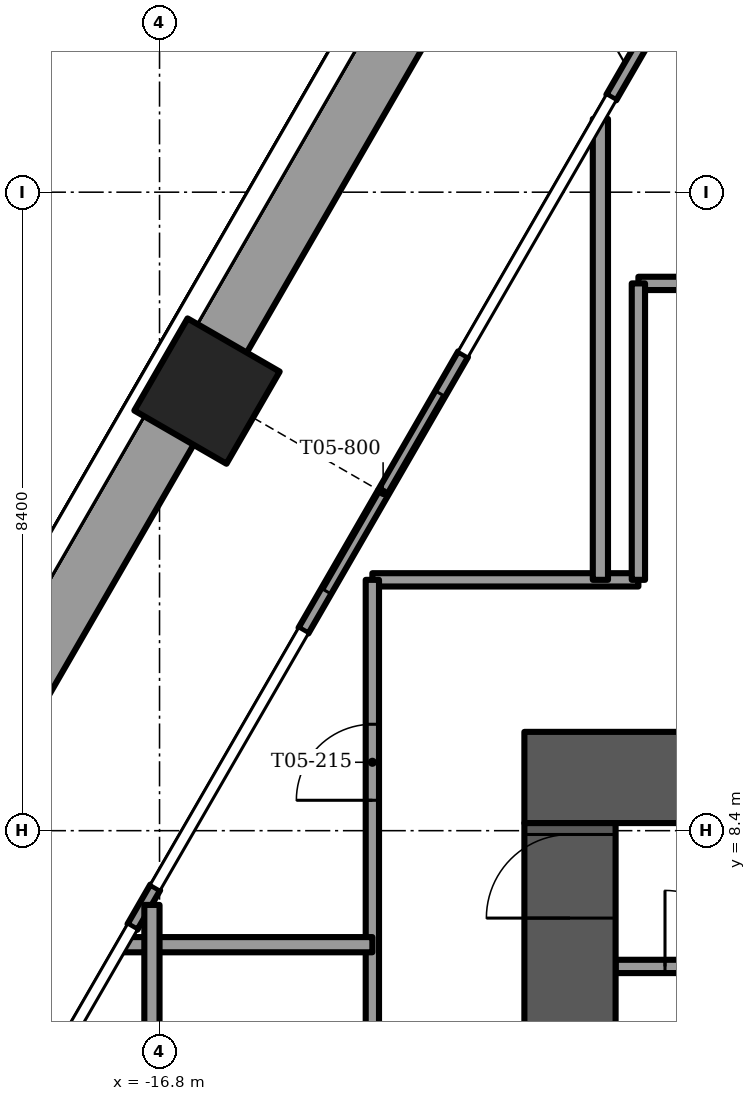
"""IFC4 building model, lengths in metres.
Left out: names, types, materials, properties, quantities, classifications, styles, units other than length and angle.
Written with IfcOpenShell. Run it as: python <this file> out.ifc"""

import sys

from ifc_helpers import new_model, si_unit, direction, frame, frame_2d, origin, origin_2d, place, context, subcontext, project, spatial, rectangle, extrude, element, fill, save


model = new_model("IFC4")
c1 = context("Model", 3, precision=1e-05, world=origin(), true_north=direction((0.0, 1.0)))
c2 = subcontext(c1, "Body", "Model", "MODEL_VIEW")
j1 = project(units=[si_unit("LENGTHUNIT", "METRE"), si_unit("PLANEANGLEUNIT", "RADIAN")], contexts=[c1])
p1 = place(None, origin())
s1 = spatial("IfcSite", under=j1, at=p1, CompositionType="ELEMENT")
p2 = place(p1, origin())
s2 = spatial("IfcBuilding", under=s1, at=p2, CompositionType="ELEMENT")
p3 = place(p2, frame((0.0, 0.0, 23.5)))
s3 = spatial("IfcBuildingStorey", under=s2, at=p3, CompositionType="ELEMENT", Elevation=23.5)
p4 = place(p3, frame((-16.175, 14.183, -1.2), z_axis=(0.0, 0.0, 1.0), x_axis=(0.5, 0.866025403784, 0.0)))
e1 = element("IfcColumn", 1, at=p4, inside=s3, PredefinedType="COLUMN", context=c2, shape_type="SweptSolid", body=[
    extrude(rectangle(XDim=1.4, YDim=1.4, at=origin_2d()), origin(), (0.0, 0.0, 1.0), 4.5),
])
p5 = place(p3, frame((-12.0, 9.1, -0.3), z_axis=(0.0, 0.0, 1.0), x_axis=(1.0, 0.0, 0.0)))
e2 = element("IfcWall", 2, at=p5, inside=s3, PredefinedType="SHEAR", context=c2, shape_type="SweptSolid", body=[
    extrude(rectangle(XDim=24.0, YDim=1.2, at=frame_2d((12.0, 0.0))), origin(), (0.0, 0.0, 1.0), 4.5),
])
p6 = place(p5, frame((11.2, 0.0, 0.0)))
e3 = element("IfcOpeningElement", 3, at=p6, cuts=e2, PredefinedType="OPENING", context=c2, shape_type="SweptSolid", body=[
    extrude(rectangle(XDim=1.6, YDim=2.1, at=frame_2d((0.8, 1.05))), frame((0.0, 0.6, 0.0), z_axis=(0.0, -1.0, 0.0), x_axis=(1.0, 0.0, 0.0)), (0.0, 0.0, 1.0), 1.2),
])
p7 = place(p5, frame((5.25, 0.0, 0.0)))
e4 = element("IfcOpeningElement", 4, at=p7, cuts=e2, PredefinedType="OPENING", context=c2, shape_type="SweptSolid", body=[
    extrude(rectangle(XDim=1.1, YDim=2.1, at=frame_2d((0.55, 1.05))), frame((0.0, 0.6, 0.0), z_axis=(0.0, -1.0, 0.0), x_axis=(1.0, 0.0, 0.0)), (0.0, 0.0, 1.0), 1.2),
])
p8 = place(p5, frame((17.65, 0.0, 0.0)))
e5 = element("IfcOpeningElement", 5, at=p8, cuts=e2, PredefinedType="OPENING", context=c2, shape_type="SweptSolid", body=[
    extrude(rectangle(XDim=1.1, YDim=2.1, at=frame_2d((0.55, 1.05))), frame((0.0, 0.6, 0.0), z_axis=(0.0, -1.0, 0.0), x_axis=(1.0, 0.0, 0.0)), (0.0, 0.0, 1.0), 1.2),
])
p9 = place(p3, frame((-11.4, -0.5, -0.3), z_axis=(0.0, 0.0, 1.0), x_axis=(0.0, 1.0, 0.0)))
e6 = element("IfcWall", 6, at=p9, inside=s3, PredefinedType="SHEAR", context=c2, shape_type="SweptSolid", body=[
    extrude(rectangle(XDim=9.0, YDim=1.2, at=frame_2d((4.5, 0.0))), origin(), (0.0, 0.0, 1.0), 4.5),
])
p10 = place(p9, frame((7.75, 0.0, 0.0)))
e7 = element("IfcOpeningElement", 7, at=p10, cuts=e6, PredefinedType="OPENING", context=c2, shape_type="SweptSolid", body=[
    extrude(rectangle(XDim=1.1, YDim=2.1, at=frame_2d((0.55, 1.05))), frame((0.0, 0.6, 0.0), z_axis=(0.0, -1.0, 0.0), x_axis=(1.0, 0.0, 0.0)), (0.0, 0.0, 1.0), 1.2),
])
p11 = place(p9, frame((0.55, 0.0, 0.0)))
e8 = element("IfcOpeningElement", 8, at=p11, cuts=e6, PredefinedType="OPENING", context=c2, shape_type="SweptSolid", body=[
    extrude(rectangle(XDim=1.2, YDim=2.1, at=frame_2d((0.6, 1.05))), frame((0.0, 0.6, 0.0), z_axis=(0.0, -1.0, 0.0), x_axis=(1.0, 0.0, 0.0)), (0.0, 0.0, 1.0), 1.2),
])
p12 = place(p9, frame((3.0, 0.0, 0.0)))
e9 = element("IfcOpeningElement", 9, at=p12, cuts=e6, PredefinedType="OPENING", context=c2, shape_type="SweptSolid", body=[
    extrude(rectangle(XDim=1.2, YDim=2.1, at=frame_2d((0.6, 1.05))), frame((0.0, 0.6, 0.0), z_axis=(0.0, -1.0, 0.0), x_axis=(1.0, 0.0, 0.0)), (0.0, 0.0, 1.0), 1.2),
])
p13 = place(p3, frame((-12.705, 20.694, 0.0), z_axis=(0.0, 0.0, 1.0), x_axis=(-0.500005133765, -0.866022439784, 0.0)))
e10 = element("IfcWall", 10, at=p13, inside=s3, PredefinedType="PARAPET", context=c2, shape_type="SweptSolid", body=[
    extrude(rectangle(XDim=6.704, YDim=0.9, at=frame_2d((3.352, 0.0))), origin(), (0.0, 0.0, 1.0), 1.1),
])
p14 = place(p3, frame((-16.727, 13.728, 0.0), z_axis=(0.0, 0.0, 1.0), x_axis=(-0.499997206141, -0.866027016814, 0.0)))
e11 = element("IfcWall", 11, at=p14, inside=s3, PredefinedType="PARAPET", context=c2, shape_type="SweptSolid", body=[
    extrude(rectangle(XDim=7.051, YDim=0.9, at=frame_2d((3.525, 0.0))), origin(), (0.0, 0.0, 1.0), 1.1),
])
p15 = place(p3, frame((-12.806, 14.668, 0.0), z_axis=(0.0, 0.0, 1.0), x_axis=(-0.500027713859, -0.866009402589, 0.0)))
e12 = element("IfcWall", 12, at=p15, inside=s3, PredefinedType="SOLIDWALL", context=c2, shape_type="SweptSolid", body=[
    extrude(rectangle(XDim=4.2, YDim=0.15, at=frame_2d((2.1, 0.0))), origin(), (0.0, 0.0, 1.0), 4.2),
])
p16 = place(p15, frame((0.6, 0.0, 0.0)))
e13 = element("IfcOpeningElement", 13, at=p16, cuts=e12, PredefinedType="OPENING", context=c2, shape_type="SweptSolid", body=[
    extrude(rectangle(XDim=3.0, YDim=2.4, at=frame_2d((1.5, 1.2))), frame((0.0, 0.075, 0.0), z_axis=(0.0, -1.0, 0.0), x_axis=(1.0, 0.0, 0.0)), (0.0, 0.0, 1.0), 0.15),
])
p17 = place(p3, frame((-9.56, 20.292, 0.0), z_axis=(0.0, 0.0, 1.0), x_axis=(-0.499945140294, -0.866057074734, 0.0)))
e14 = element("IfcWall", 14, at=p17, inside=s3, PredefinedType="SOLIDWALL", context=c2, shape_type="SweptSolid", body=[
    extrude(rectangle(XDim=2.594, YDim=0.15, at=frame_2d((1.297, 0.0))), origin(), (0.0, 0.0, 1.0), 4.2),
])
p18 = place(p3, frame((-16.856, 7.654, 0.0), z_axis=(0.0, 0.0, 1.0), x_axis=(-0.499945471869, -0.866056883327, 0.0)))
e15 = element("IfcWall", 15, at=p18, inside=s3, PredefinedType="SOLIDWALL", context=c2, shape_type="SweptSolid", body=[
    extrude(rectangle(XDim=0.6, YDim=0.15, at=frame_2d((0.3, 0.0))), origin(), (0.0, 0.0, 1.0), 4.2),
])
p19 = place(p3, frame((-10.8, 6.614, 0.0), z_axis=(0.0, 0.0, 1.0), x_axis=(1.0, 0.0, 0.0)))
e16 = element("IfcWall", 16, at=p19, inside=s3, PredefinedType="PARTITIONING", context=c2, shape_type="SweptSolid", body=[
    extrude(rectangle(XDim=2.3, YDim=0.175, at=frame_2d((1.15, 0.0))), origin(), (0.0, 0.0, 1.0), 4.2),
])
p20 = place(p19, frame((0.65, 0.0, 0.0)))
e17 = element("IfcOpeningElement", 17, at=p20, cuts=e16, PredefinedType="OPENING", context=c2, shape_type="SweptSolid", body=[
    extrude(rectangle(XDim=1.0, YDim=2.1, at=frame_2d((0.5, 1.05))), frame((0.0, 0.087, 0.0), z_axis=(0.0, -1.0, 0.0), x_axis=(1.0, 0.0, 0.0)), (0.0, 0.0, 1.0), 0.175),
])
p21 = place(p3, frame((-14.0, 11.7, 0.0), z_axis=(0.0, 0.0, 1.0), x_axis=(1.0, 0.0, 0.0)))
e18 = element("IfcWall", 18, at=p21, inside=s3, PredefinedType="PARTITIONING", context=c2, shape_type="SweptSolid", body=[
    extrude(rectangle(XDim=3.5, YDim=0.175, at=frame_2d((1.75, 0.0))), origin(), (0.0, 0.0, 1.0), 4.2),
])
p22 = place(p3, frame((-10.5, 15.6, 0.0), z_axis=(0.0, 0.0, 1.0), x_axis=(1.0, 0.0, 0.0)))
e19 = element("IfcWall", 19, at=p22, inside=s3, PredefinedType="PARTITIONING", context=c2, shape_type="SweptSolid", body=[
    extrude(rectangle(XDim=8.772, YDim=0.175, at=frame_2d((4.386, 0.0))), origin(), (0.0, 0.0, 1.0), 4.2),
])
p23 = place(p22, frame((1.8, 0.0, 0.0)))
e20 = element("IfcOpeningElement", 20, at=p23, cuts=e19, PredefinedType="OPENING", context=c2, shape_type="SweptSolid", body=[
    extrude(rectangle(XDim=0.9, YDim=2.1, at=frame_2d((0.45, 1.05))), frame((0.0, 0.087, 0.0), z_axis=(0.0, -1.0, 0.0), x_axis=(1.0, 0.0, 0.0)), (0.0, 0.0, 1.0), 0.175),
])
p24 = place(p3, frame((-14.0, -3.7, 0.0), z_axis=(0.0, 0.0, 1.0), x_axis=(0.0, 1.0, 0.0)))
e21 = element("IfcWall", 21, at=p24, inside=s3, PredefinedType="PARTITIONING", context=c2, shape_type="SweptSolid", body=[
    extrude(rectangle(XDim=15.4, YDim=0.175, at=frame_2d((7.7, 0.0))), origin(), (0.0, 0.0, 1.0), 4.2),
])
p25 = place(p24, frame((0.825, 0.0, 0.0)))
e22 = element("IfcOpeningElement", 22, at=p25, cuts=e21, PredefinedType="OPENING", context=c2, shape_type="SweptSolid", body=[
    extrude(rectangle(XDim=1.0, YDim=2.1, at=frame_2d((0.5, 1.05))), frame((0.0, 0.087, 0.0), z_axis=(0.0, -1.0, 0.0), x_axis=(1.0, 0.0, 0.0)), (0.0, 0.0, 1.0), 0.175),
])
p26 = place(p24, frame((6.125, 0.0, 0.0)))
e23 = element("IfcOpeningElement", 23, at=p26, cuts=e21, PredefinedType="OPENING", context=c2, shape_type="SweptSolid", body=[
    extrude(rectangle(XDim=1.0, YDim=2.1, at=frame_2d((0.5, 1.05))), frame((0.0, 0.087, 0.0), z_axis=(0.0, -1.0, 0.0), x_axis=(1.0, 0.0, 0.0)), (0.0, 0.0, 1.0), 0.175),
])
p27 = place(p24, frame((12.5, 0.0, 0.0)))
e24 = element("IfcOpeningElement", 24, at=p27, cuts=e21, PredefinedType="OPENING", context=c2, shape_type="SweptSolid", body=[
    extrude(rectangle(XDim=1.0, YDim=2.1, at=frame_2d((0.5, 1.05))), frame((0.0, 0.087, 0.0), z_axis=(0.0, -1.0, 0.0), x_axis=(1.0, 0.0, 0.0)), (0.0, 0.0, 1.0), 0.175),
])
p28 = place(p3, frame((-10.5, 11.7, 0.0), z_axis=(0.0, 0.0, 1.0), x_axis=(0.0, 1.0, 0.0)))
e25 = element("IfcWall", 25, at=p28, inside=s3, PredefinedType="PARTITIONING", context=c2, shape_type="SweptSolid", body=[
    extrude(rectangle(XDim=3.9, YDim=0.175, at=frame_2d((1.95, 0.0))), origin(), (0.0, 0.0, 1.0), 4.2),
])
p29 = place(p3, frame((-17.271, 6.9, 0.0), z_axis=(0.0, 0.0, 1.0), x_axis=(1.0, 0.0, 0.0)))
e26 = element("IfcWall", 26, at=p29, inside=s3, PredefinedType="PARTITIONING", context=c2, shape_type="SweptSolid", body=[
    extrude(rectangle(XDim=3.271, YDim=0.2, at=frame_2d((1.635, 0.0))), origin(), (0.0, 0.0, 1.0), 4.2),
])
p30 = place(p3, frame((-16.9, 4.7, 0.0), z_axis=(0.0, 0.0, 1.0), x_axis=(0.0, 1.0, 0.0)))
e27 = element("IfcWall", 27, at=p30, inside=s3, PredefinedType="PARTITIONING", context=c2, shape_type="SweptSolid", body=[
    extrude(rectangle(XDim=2.723, YDim=0.2, at=frame_2d((1.362, 0.0))), origin(), (0.0, 0.0, 1.0), 4.2),
])
p31 = place(p3, frame((-11.0, 11.7, 0.0), z_axis=(0.0, 0.0, 1.0), x_axis=(0.0, 1.0, 0.0)))
e28 = element("IfcWall", 28, at=p31, inside=s3, PredefinedType="PARTITIONING", context=c2, shape_type="SweptSolid", body=[
    extrude(rectangle(XDim=6.064, YDim=0.2, at=frame_2d((3.032, 0.0))), origin(), (0.0, 0.0, 1.0), 4.2),
])
p32 = place(p16, origin())
e29 = element("IfcDoor", 29, at=p32, inside=s3, OperationType="SLIDING_TO_RIGHT", PredefinedType="DOOR", context=c2, shape_type="SweptSolid", body=[
    extrude(rectangle(XDim=3.0, YDim=2.4, at=frame_2d((1.5, 1.2))), frame((0.0, 0.025, 0.0), z_axis=(0.0, -1.0, 0.0), x_axis=(1.0, 0.0, 0.0)), (0.0, 0.0, 1.0), 0.05),
])
fill(e13, e29)
p33 = place(p20, origin())
e30 = element("IfcDoor", 30, at=p33, inside=s3, OperationType="SINGLE_SWING_LEFT", PredefinedType="DOOR", context=c2, shape_type="SweptSolid", body=[
    extrude(rectangle(XDim=1.0, YDim=2.1, at=frame_2d((0.5, 1.05))), frame((0.0, 0.025, 0.0), z_axis=(0.0, -1.0, 0.0), x_axis=(1.0, 0.0, 0.0)), (0.0, 0.0, 1.0), 0.05),
])
fill(e17, e30)
p34 = place(p10, origin())
e31 = element("IfcDoor", 31, at=p34, inside=s3, OperationType="SINGLE_SWING_LEFT", PredefinedType="DOOR", context=c2, shape_type="SweptSolid", body=[
    extrude(rectangle(XDim=1.1, YDim=2.1, at=frame_2d((0.55, 1.05))), frame((0.0, 0.025, 0.0), z_axis=(0.0, -1.0, 0.0), x_axis=(1.0, 0.0, 0.0)), (0.0, 0.0, 1.0), 0.05),
])
fill(e7, e31)
p35 = place(p27, origin())
e32 = element("IfcDoor", 32, at=p35, inside=s3, OperationType="SINGLE_SWING_LEFT", PredefinedType="DOOR", context=c2, shape_type="SweptSolid", body=[
    extrude(rectangle(XDim=1.0, YDim=2.1, at=frame_2d((0.5, 1.05))), frame((0.0, 0.025, 0.0), z_axis=(0.0, -1.0, 0.0), x_axis=(1.0, 0.0, 0.0)), (0.0, 0.0, 1.0), 0.05),
])
fill(e24, e32)
save(model, sys.argv[1])
